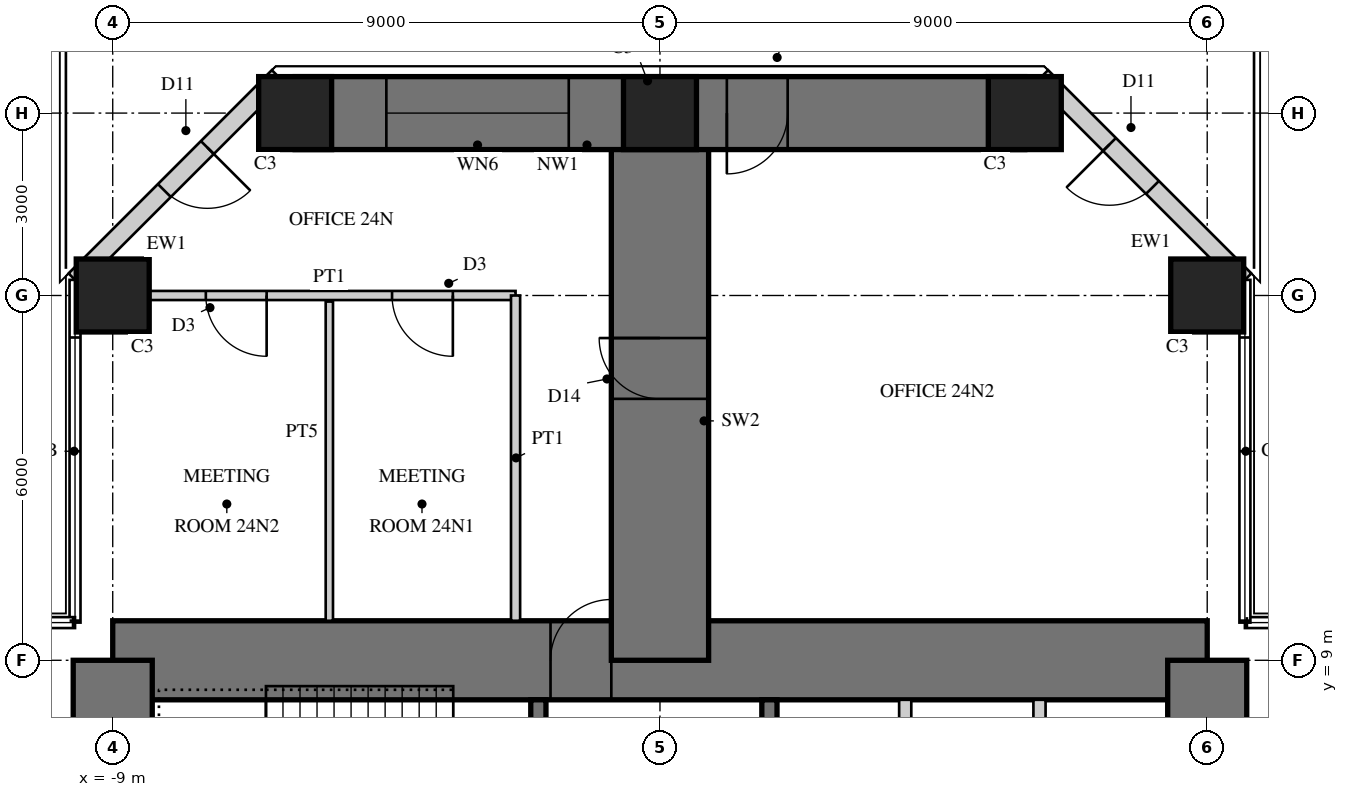
"""IFC4 building model, lengths in metres.
Left out: names, types, materials, properties, quantities, classifications, styles, units other than length and angle.
Written with IfcOpenShell. Run it as: python <this file> out.ifc"""

import sys

from ifc_helpers import new_model, si_unit, direction, frame, frame_2d, origin, origin_2d, place, context, subcontext, project, spatial, rectangle, hollow_rectangle, extrude, element, fill, save


model = new_model("IFC4")
c1 = context("Model", 3, precision=1e-05, world=origin(), true_north=direction((0.0, 1.0)))
c2 = subcontext(c1, "Body", "Model", "MODEL_VIEW")
j1 = project(units=[si_unit("LENGTHUNIT", "METRE"), si_unit("PLANEANGLEUNIT", "RADIAN")], contexts=[c1])
p1 = place(None, origin())
s1 = spatial("IfcSite", under=j1, at=p1, CompositionType="ELEMENT")
p2 = place(p1, origin())
s2 = spatial("IfcBuilding", under=s1, at=p2, CompositionType="ELEMENT")
p3 = place(p2, frame((0.0, 0.0, 100.5)))
s3 = spatial("IfcBuildingStorey", under=s2, at=p3, CompositionType="ELEMENT", Elevation=100.5)
p4 = place(p3, frame((9.0, 9.0, 0.0), z_axis=(0.0, 0.0, 1.0), x_axis=(-1.0, 0.0, 0.0)))
e1 = element("IfcWall", 1, at=p4, inside=s3, PredefinedType="SHEAR", context=c2, shape_type="SweptSolid", body=[
    extrude(rectangle(XDim=18.0, YDim=1.3, at=frame_2d((9.0, 0.0))), origin(), (0.0, 0.0, 1.0), 4.0),
])
p5 = place(p4, frame((9.8, 0.0, 0.0)))
e2 = element("IfcOpeningElement", 2, at=p5, cuts=e1, PredefinedType="OPENING", context=c2, shape_type="SweptSolid", body=[
    extrude(rectangle(XDim=1.0, YDim=2.4, at=frame_2d((0.5, 1.2))), frame((0.0, 0.66, 0.0), z_axis=(0.0, -1.0, 0.0), x_axis=(1.0, 0.0, 0.0)), (0.0, 0.0, 1.0), 1.32),
])
p6 = place(p3, frame((9.0, -9.0, 0.0), z_axis=(0.0, 0.0, 1.0), x_axis=(0.0, 1.0, 0.0)))
e3 = element("IfcWall", 3, at=p6, inside=s3, PredefinedType="SHEAR", context=c2, shape_type="SweptSolid", body=[
    extrude(rectangle(XDim=18.0, YDim=1.3, at=frame_2d((9.0, 0.0))), origin(), (0.0, 0.0, 1.0), 4.0),
])
p7 = place(p6, frame((9.8, 0.0, 0.0)))
e4 = element("IfcOpeningElement", 4, at=p7, cuts=e3, PredefinedType="OPENING", context=c2, shape_type="SweptSolid", body=[
    extrude(rectangle(XDim=1.0, YDim=2.4, at=frame_2d((0.5, 1.2))), frame((0.0, 0.66, 0.0), z_axis=(0.0, -1.0, 0.0), x_axis=(1.0, 0.0, 0.0)), (0.0, 0.0, 1.0), 1.32),
])
p8 = place(p3, frame((-9.0, 9.0, 0.0), z_axis=(0.0, 0.0, 1.0), x_axis=(0.0, -1.0, 0.0)))
e5 = element("IfcWall", 5, at=p8, inside=s3, PredefinedType="SHEAR", context=c2, shape_type="SweptSolid", body=[
    extrude(rectangle(XDim=18.0, YDim=1.3, at=frame_2d((9.0, 0.0))), origin(), (0.0, 0.0, 1.0), 4.0),
])
p9 = place(p8, frame((9.8, 0.0, 0.0)))
e6 = element("IfcOpeningElement", 6, at=p9, cuts=e5, PredefinedType="OPENING", context=c2, shape_type="SweptSolid", body=[
    extrude(rectangle(XDim=1.0, YDim=2.4, at=frame_2d((0.5, 1.2))), frame((0.0, 0.66, 0.0), z_axis=(0.0, -1.0, 0.0), x_axis=(1.0, 0.0, 0.0)), (0.0, 0.0, 1.0), 1.32),
])
p10 = place(p3, frame((1.8, 1.875, 0.0), z_axis=(0.0, 0.0, 1.0), x_axis=(0.0, 1.0, 0.0)))
e7 = element("IfcWall", 7, at=p10, inside=s3, PredefinedType="SHEAR", context=c2, shape_type="SweptSolid", body=[
    extrude(rectangle(XDim=6.475, YDim=0.25, at=frame_2d((3.238, 0.0))), origin(), (0.0, 0.0, 1.0), 4.0),
])
p11 = place(p10, frame((1.875, 0.0, 0.0)))
e8 = element("IfcOpeningElement", 8, at=p11, cuts=e7, PredefinedType="OPENING", context=c2, shape_type="SweptSolid", body=[
    extrude(rectangle(XDim=1.6, YDim=2.4, at=frame_2d((0.8, 1.2))), frame((0.0, 0.135, 0.0), z_axis=(0.0, -1.0, 0.0), x_axis=(1.0, 0.0, 0.0)), (0.0, 0.0, 1.0), 0.27),
])
for number, where, z_axis, x_axis in (
    (9, (4.033, 5.975, 0.0), (0.0, 0.0, 1.0), (0.0, 1.0, 0.0)),
    (10, (6.242, 5.975, 0.0), (0.0, 0.0, 1.0), (0.0, 1.0, 0.0)),
):
    element("IfcWall", number, at=place(p3, frame(where, z_axis=z_axis, x_axis=x_axis)), inside=s3, PredefinedType="PARTITIONING", context=c2, shape_type="SweptSolid", body=[
        extrude(rectangle(XDim=2.375, YDim=0.2, at=frame_2d((1.188, 0.0))), origin(), (0.0, 0.0, 1.0), 4.0),
    ])
p12 = place(p3, frame((-2.0, 1.675, 0.0), z_axis=(0.0, 0.0, 1.0), x_axis=(0.0, 1.0, 0.0)))
e11 = element("IfcWall", 11, at=p12, inside=s3, PredefinedType="SHEAR", context=c2, shape_type="SweptSolid", body=[
    extrude(rectangle(XDim=6.675, YDim=0.25, at=frame_2d((3.337, 0.0))), origin(), (0.0, 0.0, 1.0), 4.0),
])
p13 = place(p12, frame((0.725, 0.0, 0.0)))
e12 = element("IfcOpeningElement", 12, at=p13, cuts=e11, PredefinedType="OPENING", context=c2, shape_type="SweptSolid", body=[
    extrude(rectangle(XDim=1.0, YDim=2.1, at=frame_2d((0.5, 1.05))), frame((0.0, 0.135, 0.0), z_axis=(0.0, -1.0, 0.0), x_axis=(1.0, 0.0, 0.0)), (0.0, 0.0, 1.0), 0.27),
])
p14 = place(p3, frame((0.0, 9.0, 0.0), z_axis=(0.0, 0.0, 1.0), x_axis=(0.0, 1.0, 0.0)))
e13 = element("IfcWall", 13, at=p14, inside=s3, PredefinedType="SHEAR", context=c2, shape_type="SweptSolid", body=[
    extrude(rectangle(XDim=9.0, YDim=1.6, at=frame_2d((4.5, 0.0))), origin(), (0.0, 0.0, 1.0), 4.0),
])
p15 = place(p14, frame((4.3, 0.0, 0.0)))
e14 = element("IfcOpeningElement", 14, at=p15, cuts=e13, PredefinedType="OPENING", context=c2, shape_type="SweptSolid", body=[
    extrude(rectangle(XDim=1.0, YDim=2.2, at=frame_2d((0.5, 1.1))), frame((0.0, 0.81, 0.0), z_axis=(0.0, -1.0, 0.0), x_axis=(1.0, 0.0, 0.0)), (0.0, 0.0, 1.0), 1.62),
])
p16 = place(p3, frame((6.0, 18.0, 0.0), z_axis=(0.0, 0.0, 1.0), x_axis=(-1.0, 0.0, 0.0)))
e15 = element("IfcWall", 15, at=p16, inside=s3, PredefinedType="SHEAR", context=c2, shape_type="SweptSolid", body=[
    extrude(rectangle(XDim=12.0, YDim=1.2, at=frame_2d((6.0, 0.0))), origin(), (0.0, 0.0, 1.0), 4.0),
])
p17 = place(p16, frame((3.9, 0.0, 0.0)))
e16 = element("IfcOpeningElement", 16, at=p17, cuts=e15, PredefinedType="OPENING", context=c2, shape_type="SweptSolid", body=[
    extrude(rectangle(XDim=1.0, YDim=2.4, at=frame_2d((0.5, 1.2))), frame((0.0, 0.61, 0.0), z_axis=(0.0, -1.0, 0.0), x_axis=(1.0, 0.0, 0.0)), (0.0, 0.0, 1.0), 1.22),
])
p18 = place(p16, frame((7.5, 0.0, 0.6)))
e17 = element("IfcOpeningElement", 17, at=p18, cuts=e15, PredefinedType="OPENING", context=c2, shape_type="SweptSolid", body=[
    extrude(rectangle(XDim=3.0, YDim=2.4, at=frame_2d((1.5, 1.2))), frame((0.0, 0.61, 0.0), z_axis=(0.0, -1.0, 0.0), x_axis=(1.0, 0.0, 0.0)), (0.0, 0.0, 1.0), 1.22),
])
for number, where, z_axis, x_axis in (
    (18, (9.0, 15.0, 0.0), (0.0, 0.0, 1.0), (1.0, 0.0, 0.0)),
    (19, (-9.0, 15.0, 0.0), (0.0, 0.0, 1.0), (1.0, 0.0, 0.0)),
    (20, (6.0, 18.0, 0.0), (0.0, 0.0, 1.0), (1.0, 0.0, 0.0)),
    (21, (0.0, 18.0, 0.0), (0.0, 0.0, 1.0), (1.0, 0.0, 0.0)),
    (22, (-6.0, 18.0, 0.0), (0.0, 0.0, 1.0), (1.0, 0.0, 0.0)),
):
    element("IfcColumn", number, at=place(p3, frame(where, z_axis=z_axis, x_axis=x_axis)), inside=s3, PredefinedType="COLUMN", context=c2, shape_type="SweptSolid", body=[
        extrude(rectangle(XDim=1.2, YDim=1.2, at=origin_2d()), origin(), (0.0, 0.0, 1.0), 4.0),
    ])
p19 = place(p3, frame((9.62, 15.257, 0.0), z_axis=(0.0, 0.0, 1.0), x_axis=(-0.707106781187, 0.707106781187, 0.0)))
e23 = element("IfcWall", 23, at=p19, inside=s3, PredefinedType="SOLIDWALL", context=c2, shape_type="SweptSolid", body=[
    extrude(rectangle(XDim=4.728, YDim=0.3, at=frame_2d((2.364, 0.0))), origin(), (0.0, 0.0, 1.0), 3.8),
])
p20 = place(p19, frame((2.15, 0.0, 0.0)))
e24 = element("IfcOpeningElement", 24, at=p20, cuts=e23, PredefinedType="OPENING", context=c2, shape_type="SweptSolid", body=[
    extrude(rectangle(XDim=1.0, YDim=2.4, at=frame_2d((0.5, 1.2))), frame((0.0, 0.16, 0.0), z_axis=(0.0, -1.0, 0.0), x_axis=(1.0, 0.0, 0.0)), (0.0, 0.0, 1.0), 0.32),
])
p21 = place(p3, frame((-6.277, 18.6, 0.0), z_axis=(0.0, 0.0, 1.0), x_axis=(-0.707106781187, -0.707106781187, 0.0)))
e25 = element("IfcWall", 25, at=p21, inside=s3, PredefinedType="SOLIDWALL", context=c2, shape_type="SweptSolid", body=[
    extrude(rectangle(XDim=4.728, YDim=0.3, at=frame_2d((2.364, 0.0))), origin(), (0.0, 0.0, 1.0), 3.8),
])
p22 = place(p21, frame((1.65, 0.0, 0.0)))
e26 = element("IfcOpeningElement", 26, at=p22, cuts=e25, PredefinedType="OPENING", context=c2, shape_type="SweptSolid", body=[
    extrude(rectangle(XDim=1.0, YDim=2.4, at=frame_2d((0.5, 1.2))), frame((0.0, 0.16, 0.0), z_axis=(0.0, -1.0, 0.0), x_axis=(1.0, 0.0, 0.0)), (0.0, 0.0, 1.0), 0.32),
])
p23 = place(p3, frame((-2.375, 15.0, 0.0), z_axis=(0.0, 0.0, 1.0), x_axis=(-1.0, 0.0, 0.0)))
e27 = element("IfcWall", 27, at=p23, inside=s3, PredefinedType="PARTITIONING", context=c2, shape_type="SweptSolid", body=[
    extrude(rectangle(XDim=6.125, YDim=0.15, at=frame_2d((3.062, 0.0))), origin(), (0.0, 0.0, 1.0), 3.0),
])
p24 = place(p23, frame((1.031, 0.0, 0.0)))
e28 = element("IfcOpeningElement", 28, at=p24, cuts=e27, PredefinedType="OPENING", context=c2, shape_type="SweptSolid", body=[
    extrude(rectangle(XDim=1.0, YDim=2.1, at=frame_2d((0.5, 1.05))), frame((0.0, 0.085, 0.0), z_axis=(0.0, -1.0, 0.0), x_axis=(1.0, 0.0, 0.0)), (0.0, 0.0, 1.0), 0.17),
])
p25 = place(p23, frame((4.094, 0.0, 0.0)))
e29 = element("IfcOpeningElement", 29, at=p25, cuts=e27, PredefinedType="OPENING", context=c2, shape_type="SweptSolid", body=[
    extrude(rectangle(XDim=1.0, YDim=2.1, at=frame_2d((0.5, 1.05))), frame((0.0, 0.085, 0.0), z_axis=(0.0, -1.0, 0.0), x_axis=(1.0, 0.0, 0.0)), (0.0, 0.0, 1.0), 0.17),
])
p26 = place(p3, frame((-2.375, 9.65, 0.0), z_axis=(0.0, 0.0, 1.0), x_axis=(0.0, 1.0, 0.0)))
e30 = element("IfcWall", 30, at=p26, inside=s3, PredefinedType="PARTITIONING", context=c2, shape_type="SweptSolid", body=[
    extrude(rectangle(XDim=5.35, YDim=0.15, at=frame_2d((2.675, 0.0))), origin(), (0.0, 0.0, 1.0), 3.8),
])
p27 = place(p3, frame((-5.438, 9.65, 0.0), z_axis=(0.0, 0.0, 1.0), x_axis=(0.0, 1.0, 0.0)))
e31 = element("IfcWall", 31, at=p27, inside=s3, PredefinedType="PLUMBINGWALL", context=c2, shape_type="SweptSolid", body=[
    extrude(rectangle(XDim=5.25, YDim=0.12, at=frame_2d((2.625, 0.0))), origin(), (0.0, 0.0, 1.0), 3.8),
])
p28 = place(p20, origin())
e32 = element("IfcDoor", 32, at=p28, inside=s3, OperationType="SINGLE_SWING_RIGHT", PredefinedType="DOOR", context=c2, shape_type="SweptSolid", body=[
    extrude(hollow_rectangle(XDim=1.0, YDim=2.4, WallThickness=0.06, at=frame_2d((0.5, 1.2))), frame((0.0, 0.025, 0.0), z_axis=(0.0, -1.0, 0.0), x_axis=(1.0, 0.0, 0.0)), (0.0, 0.0, 1.0), 0.05),
    extrude(rectangle(XDim=0.879, YDim=2.279, at=frame_2d((0.5, 1.2))), frame((0.0, 0.025, 0.0), z_axis=(0.0, -1.0, 0.0), x_axis=(1.0, 0.0, 0.0)), (0.0, 0.0, 1.0), 0.05),
])
fill(e24, e32)
p29 = place(p17, origin())
e33 = element("IfcDoor", 33, at=p29, inside=s3, OperationType="SINGLE_SWING_RIGHT", PredefinedType="DOOR", context=c2, shape_type="SweptSolid", body=[
    extrude(hollow_rectangle(XDim=1.0, YDim=2.4, WallThickness=0.06, at=frame_2d((0.5, 1.2))), frame((0.0, 0.025, 0.0), z_axis=(0.0, -1.0, 0.0), x_axis=(1.0, 0.0, 0.0)), (0.0, 0.0, 1.0), 0.05),
    extrude(rectangle(XDim=0.879, YDim=2.279, at=frame_2d((0.5, 1.2))), frame((0.0, 0.025, 0.0), z_axis=(0.0, -1.0, 0.0), x_axis=(1.0, 0.0, 0.0)), (0.0, 0.0, 1.0), 0.05),
])
fill(e16, e33)
p30 = place(p18, origin())
e34 = element("IfcWindow", 34, at=p30, inside=s3, PartitioningType="SINGLE_PANEL", PredefinedType="WINDOW", context=c2, shape_type="SweptSolid", body=[
    extrude(hollow_rectangle(XDim=3.0, YDim=2.4, WallThickness=0.06, at=frame_2d((1.5, 1.2))), frame((0.0, 0.03, 0.0), z_axis=(0.0, -1.0, 0.0), x_axis=(1.0, 0.0, 0.0)), (0.0, 0.0, 1.0), 0.06),
    extrude(rectangle(XDim=2.879, YDim=2.279, at=frame_2d((1.5, 1.2))), frame((0.0, 0.03, 0.0), z_axis=(0.0, -1.0, 0.0), x_axis=(1.0, 0.0, 0.0)), (0.0, 0.0, 1.0), 0.06),
])
fill(e17, e34)
p31 = place(p22, origin())
e35 = element("IfcDoor", 35, at=p31, inside=s3, OperationType="SINGLE_SWING_LEFT", PredefinedType="DOOR", context=c2, shape_type="SweptSolid", body=[
    extrude(hollow_rectangle(XDim=1.0, YDim=2.4, WallThickness=0.06, at=frame_2d((0.5, 1.2))), frame((0.0, 0.025, 0.0), z_axis=(0.0, -1.0, 0.0), x_axis=(1.0, 0.0, 0.0)), (0.0, 0.0, 1.0), 0.05),
    extrude(rectangle(XDim=0.879, YDim=2.279, at=frame_2d((0.5, 1.2))), frame((0.0, 0.025, 0.0), z_axis=(0.0, -1.0, 0.0), x_axis=(1.0, 0.0, 0.0)), (0.0, 0.0, 1.0), 0.05),
])
fill(e26, e35)
p32 = place(p24, origin())
e36 = element("IfcDoor", 36, at=p32, inside=s3, OperationType="SINGLE_SWING_LEFT", PredefinedType="DOOR", context=c2, shape_type="SweptSolid", body=[
    extrude(rectangle(XDim=1.0, YDim=2.1, at=frame_2d((0.5, 1.05))), frame((0.0, 0.025, 0.0), z_axis=(0.0, -1.0, 0.0), x_axis=(1.0, 0.0, 0.0)), (0.0, 0.0, 1.0), 0.05),
])
fill(e28, e36)
p33 = place(p25, origin())
e37 = element("IfcDoor", 37, at=p33, inside=s3, OperationType="SINGLE_SWING_LEFT", PredefinedType="DOOR", context=c2, shape_type="SweptSolid", body=[
    extrude(rectangle(XDim=1.0, YDim=2.1, at=frame_2d((0.5, 1.05))), frame((0.0, 0.025, 0.0), z_axis=(0.0, -1.0, 0.0), x_axis=(1.0, 0.0, 0.0)), (0.0, 0.0, 1.0), 0.05),
])
fill(e29, e37)
p34 = place(p15, origin())
e38 = element("IfcDoor", 38, at=p34, inside=s3, OperationType="SINGLE_SWING_RIGHT", PredefinedType="DOOR", context=c2, shape_type="SweptSolid", body=[
    extrude(rectangle(XDim=1.0, YDim=2.2, at=frame_2d((0.5, 1.1))), frame((0.0, 0.025, 0.0), z_axis=(0.0, -1.0, 0.0), x_axis=(1.0, 0.0, 0.0)), (0.0, 0.0, 1.0), 0.05),
])
fill(e14, e38)
p35 = place(p5, frame((1.0, 0.0, 0.0), z_axis=(0.0, 0.0, 1.0), x_axis=(-1.0, 0.0, 0.0)))
e39 = element("IfcDoor", 39, at=p35, inside=s3, OperationType="SINGLE_SWING_RIGHT", PredefinedType="DOOR", context=c2, shape_type="SweptSolid", body=[
    extrude(rectangle(XDim=1.0, YDim=2.4, at=frame_2d((0.5, 1.2))), frame((0.0, -0.005, 0.0), z_axis=(0.0, -1.0, 0.0), x_axis=(1.0, 0.0, 0.0)), (0.0, 0.0, 1.0), 0.05),
])
fill(e2, e39)
save(model, sys.argv[1])
